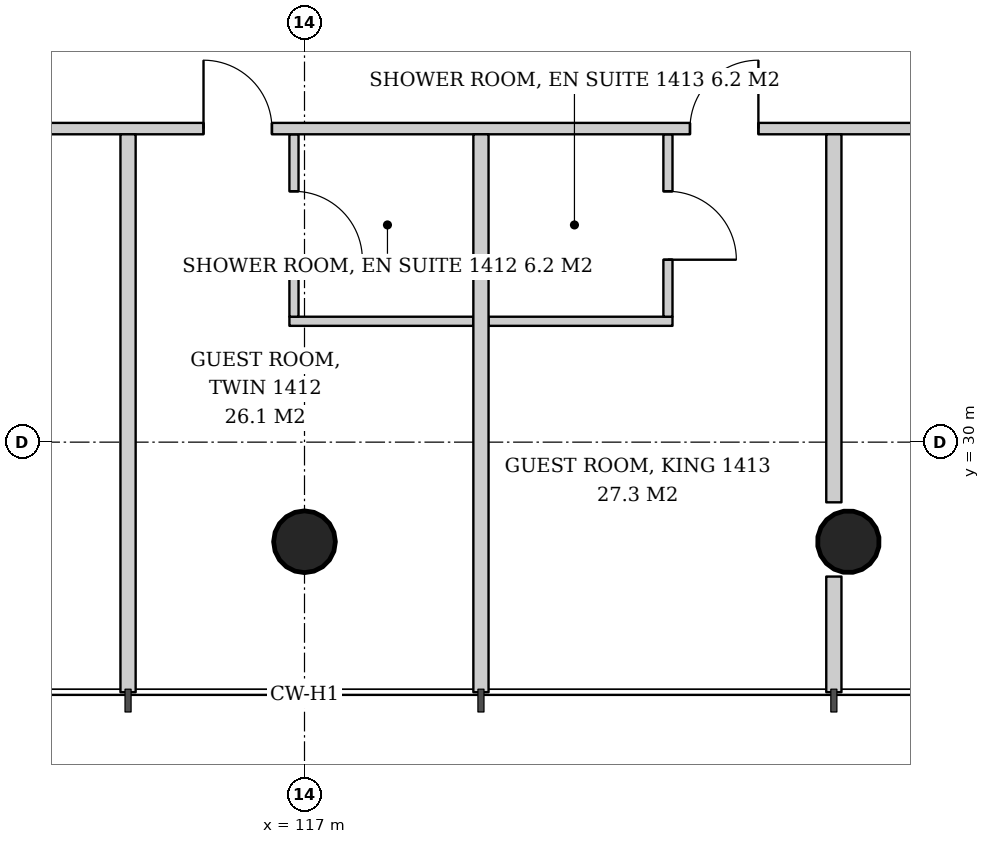
"""IFC4 building model, lengths in metres.
Left out: names, types, materials, properties, quantities, classifications, styles, units other than length and angle.
Written with IfcOpenShell. Run it as: python <this file> out.ifc"""

import sys

from ifc_helpers import new_model, si_unit, direction, frame, frame_2d, origin, origin_2d, place, context, subcontext, project, spatial, rectangle, hollow_circle, extrude, element, fill, save


model = new_model("IFC4")
c1 = context("Model", 3, precision=1e-05, world=origin(), true_north=direction((0.0, 1.0)))
c2 = subcontext(c1, "Body", "Model", "MODEL_VIEW")
j1 = project(units=[si_unit("LENGTHUNIT", "METRE"), si_unit("PLANEANGLEUNIT", "RADIAN")], contexts=[c1])
p1 = place(None, origin())
s1 = spatial("IfcSite", under=j1, at=p1, CompositionType="ELEMENT")
p2 = place(p1, origin())
s2 = spatial("IfcBuilding", under=s1, at=p2, CompositionType="ELEMENT")
p3 = place(p2, frame((0.0, 0.0, 59.0)))
s3 = spatial("IfcBuildingStorey", under=s2, at=p3, CompositionType="ELEMENT", Elevation=59.0)
p4 = place(p3, frame((117.0, 28.638, 0.0), z_axis=(0.0, 0.043069538298, 0.999072076915), x_axis=(-1.0, 0.0, 0.0)))
e1 = element("IfcColumn", 1, at=p4, inside=s3, PredefinedType="COLUMN", context=c2, shape_type="SweptSolid", body=[
    extrude(hollow_circle(Radius=0.406, WallThickness=0.03, at=origin_2d()), origin(), (0.0, 0.0, 1.0), 3.803),
])
p5 = place(p3, frame((124.181, 28.638, 0.0), z_axis=(-0.021561848751, 0.043059525333, 0.998839808957), x_axis=(-0.894160516368, -0.44774654769, 0.0)))
e2 = element("IfcColumn", 2, at=p5, inside=s3, PredefinedType="COLUMN", context=c2, shape_type="SweptSolid", body=[
    extrude(hollow_circle(Radius=0.406, WallThickness=0.03, at=origin_2d()), origin(), (0.0, 0.0, 1.0), 3.804),
])
p6 = place(p3, frame((116.802, 31.59, 0.0), z_axis=(0.0, 0.0, 1.0), x_axis=(1.0, 0.0, 0.0)))
e3 = element("IfcWall", 3, at=p6, inside=s3, PredefinedType="PARTITIONING", context=c2, shape_type="SweptSolid", body=[
    extrude(rectangle(XDim=2.42, YDim=0.12, at=frame_2d((1.21, 0.0))), origin(), (0.0, 0.0, 1.0), 3.6),
])
p7 = place(p3, frame((116.861, 34.05, 0.0), z_axis=(0.0, 0.0, 1.0), x_axis=(0.0, -1.0, 0.0)))
e4 = element("IfcWall", 4, at=p7, inside=s3, PredefinedType="PARTITIONING", context=c2, shape_type="SweptSolid", body=[
    extrude(rectangle(XDim=2.4, YDim=0.12, at=frame_2d((1.2, 0.0))), origin(), (0.0, 0.0, 1.0), 3.6),
])
p8 = place(p7, frame((0.75, 0.0, 0.0)))
e5 = element("IfcOpeningElement", 5, at=p8, cuts=e4, PredefinedType="OPENING", context=c2, shape_type="SweptSolid", body=[
    extrude(rectangle(XDim=0.9, YDim=2.1, at=frame_2d((0.45, 1.05))), frame((0.0, 0.07, 0.0), z_axis=(0.0, -1.0, 0.0), x_axis=(1.0, 0.0, 0.0)), (0.0, 0.0, 1.0), 0.14),
])
p9 = place(p3, frame((119.421, 31.59, 0.0), z_axis=(0.0, 0.0, 1.0), x_axis=(1.0, 0.0, 0.0)))
e6 = element("IfcWall", 6, at=p9, inside=s3, PredefinedType="PARTITIONING", context=c2, shape_type="SweptSolid", body=[
    extrude(rectangle(XDim=2.42, YDim=0.12, at=frame_2d((1.21, 0.0))), origin(), (0.0, 0.0, 1.0), 2.847),
])
p10 = place(p3, frame((121.781, 34.05, 0.0), z_axis=(0.0, 0.0, 1.0), x_axis=(0.0, -1.0, 0.0)))
e7 = element("IfcWall", 7, at=p10, inside=s3, PredefinedType="PARTITIONING", context=c2, shape_type="SweptSolid", body=[
    extrude(rectangle(XDim=2.4, YDim=0.12, at=frame_2d((1.2, 0.0))), origin(), (0.0, 0.0, 1.0), 3.6),
])
p11 = place(p10, frame((0.75, 0.0, 0.0)))
e8 = element("IfcOpeningElement", 8, at=p11, cuts=e7, PredefinedType="OPENING", context=c2, shape_type="SweptSolid", body=[
    extrude(rectangle(XDim=0.9, YDim=2.1, at=frame_2d((0.45, 1.05))), frame((0.0, 0.07, 0.0), z_axis=(0.0, -1.0, 0.0), x_axis=(1.0, 0.0, 0.0)), (0.0, 0.0, 1.0), 0.14),
])
p12 = place(p3, frame((105.05, 34.125, 0.0), z_axis=(0.0, 0.0, 1.0), x_axis=(1.0, 0.0, 0.0)))
e9 = element("IfcWall", 9, at=p12, inside=s3, PredefinedType="PARTITIONING", context=c2, shape_type="SweptSolid", body=[
    extrude(rectangle(XDim=23.75, YDim=0.15, at=frame_2d((11.875, 0.0))), origin(), (0.0, 0.0, 1.0), 2.8),
])
p13 = place(p12, frame((2.068, 0.0, 0.0)))
e10 = element("IfcOpeningElement", 10, at=p13, cuts=e9, PredefinedType="OPENING", context=c2, shape_type="SweptSolid", body=[
    extrude(rectangle(XDim=0.9, YDim=2.1, at=frame_2d((0.45, 1.05))), frame((0.0, 0.085, 0.0), z_axis=(0.0, -1.0, 0.0), x_axis=(1.0, 0.0, 0.0)), (0.0, 0.0, 1.0), 0.17),
])
p14 = place(p12, frame((10.621, 0.0, 0.0)))
e11 = element("IfcOpeningElement", 11, at=p14, cuts=e9, PredefinedType="OPENING", context=c2, shape_type="SweptSolid", body=[
    extrude(rectangle(XDim=0.9, YDim=2.1, at=frame_2d((0.45, 1.05))), frame((0.0, 0.085, 0.0), z_axis=(0.0, -1.0, 0.0), x_axis=(1.0, 0.0, 0.0)), (0.0, 0.0, 1.0), 0.17),
])
p15 = place(p12, frame((17.021, 0.0, 0.0)))
e12 = element("IfcOpeningElement", 12, at=p15, cuts=e9, PredefinedType="OPENING", context=c2, shape_type="SweptSolid", body=[
    extrude(rectangle(XDim=0.9, YDim=2.1, at=frame_2d((0.45, 1.05))), frame((0.0, 0.085, 0.0), z_axis=(0.0, -1.0, 0.0), x_axis=(1.0, 0.0, 0.0)), (0.0, 0.0, 1.0), 0.17),
])
for number, where, z_axis, x_axis in (
    (13, (114.678, 34.05, 0.0), (0.0, 0.0, 1.0), (0.0, -1.0, 0.0)),
    (14, (119.322, 34.05, 0.0), (0.0, 0.0, 1.0), (0.0, -1.0, 0.0)),
):
    element("IfcWall", number, at=place(p3, frame(where, z_axis=z_axis, x_axis=x_axis)), inside=s3, PredefinedType="PARTITIONING", context=c2, shape_type="SweptSolid", body=[
        extrude(rectangle(XDim=7.34, YDim=0.2, at=frame_2d((3.67, 0.0))), origin(), (0.0, 0.0, 1.0), 3.05),
    ])
p16 = place(p3, frame((123.964, 34.05, 0.0), z_axis=(0.0, 0.0, 1.0), x_axis=(0.0, -1.0, 0.0)))
e15 = element("IfcWall", 15, at=p16, inside=s3, PredefinedType="PARTITIONING", context=c2, shape_type="SweptSolid", body=[
    extrude(rectangle(XDim=4.842, YDim=0.2, at=frame_2d((2.421, 0.0))), origin(), (0.0, 0.0, 1.0), 3.6),
])
p17 = place(p3, frame((123.964, 28.231, 0.0), z_axis=(0.0, 0.0, 1.0), x_axis=(0.0, -1.0, 0.0)))
e16 = element("IfcWall", 16, at=p17, inside=s3, PredefinedType="PARTITIONING", context=c2, shape_type="SweptSolid", body=[
    extrude(rectangle(XDim=1.521, YDim=0.2, at=frame_2d((0.761, 0.0))), origin(), (0.0, 0.0, 1.0), 3.6),
])
p18 = place(p8, origin())
e17 = element("IfcDoor", 17, at=p18, inside=s3, OperationType="SINGLE_SWING_RIGHT", PredefinedType="DOOR", context=c2, shape_type="SweptSolid", body=[
    extrude(rectangle(XDim=0.9, YDim=2.1, at=frame_2d((0.45, 1.05))), frame((0.0, 0.025, 0.0), z_axis=(0.0, -1.0, 0.0), x_axis=(1.0, 0.0, 0.0)), (0.0, 0.0, 1.0), 0.05),
])
fill(e5, e17)
p19 = place(p11, origin())
e18 = element("IfcDoor", 18, at=p19, inside=s3, OperationType="SINGLE_SWING_RIGHT", PredefinedType="DOOR", context=c2, shape_type="SweptSolid", body=[
    extrude(rectangle(XDim=0.9, YDim=2.1, at=frame_2d((0.45, 1.05))), frame((0.0, 0.025, 0.0), z_axis=(0.0, -1.0, 0.0), x_axis=(1.0, 0.0, 0.0)), (0.0, 0.0, 1.0), 0.05),
])
fill(e8, e18)
p20 = place(p14, origin())
e19 = element("IfcDoor", 19, at=p20, inside=s3, OperationType="SINGLE_SWING_LEFT", PredefinedType="DOOR", context=c2, shape_type="SweptSolid", body=[
    extrude(rectangle(XDim=0.9, YDim=2.1, at=frame_2d((0.45, 1.05))), frame((0.0, 0.025, 0.0), z_axis=(0.0, -1.0, 0.0), x_axis=(1.0, 0.0, 0.0)), (0.0, 0.0, 1.0), 0.05),
])
fill(e11, e19)
p21 = place(p15, origin())
e20 = element("IfcDoor", 20, at=p21, inside=s3, OperationType="SINGLE_SWING_RIGHT", PredefinedType="DOOR", context=c2, shape_type="SweptSolid", body=[
    extrude(rectangle(XDim=0.9, YDim=2.1, at=frame_2d((0.45, 1.05))), frame((0.0, 0.025, 0.0), z_axis=(0.0, -1.0, 0.0), x_axis=(1.0, 0.0, 0.0)), (0.0, 0.0, 1.0), 0.05),
])
fill(e12, e20)
save(model, sys.argv[1])
